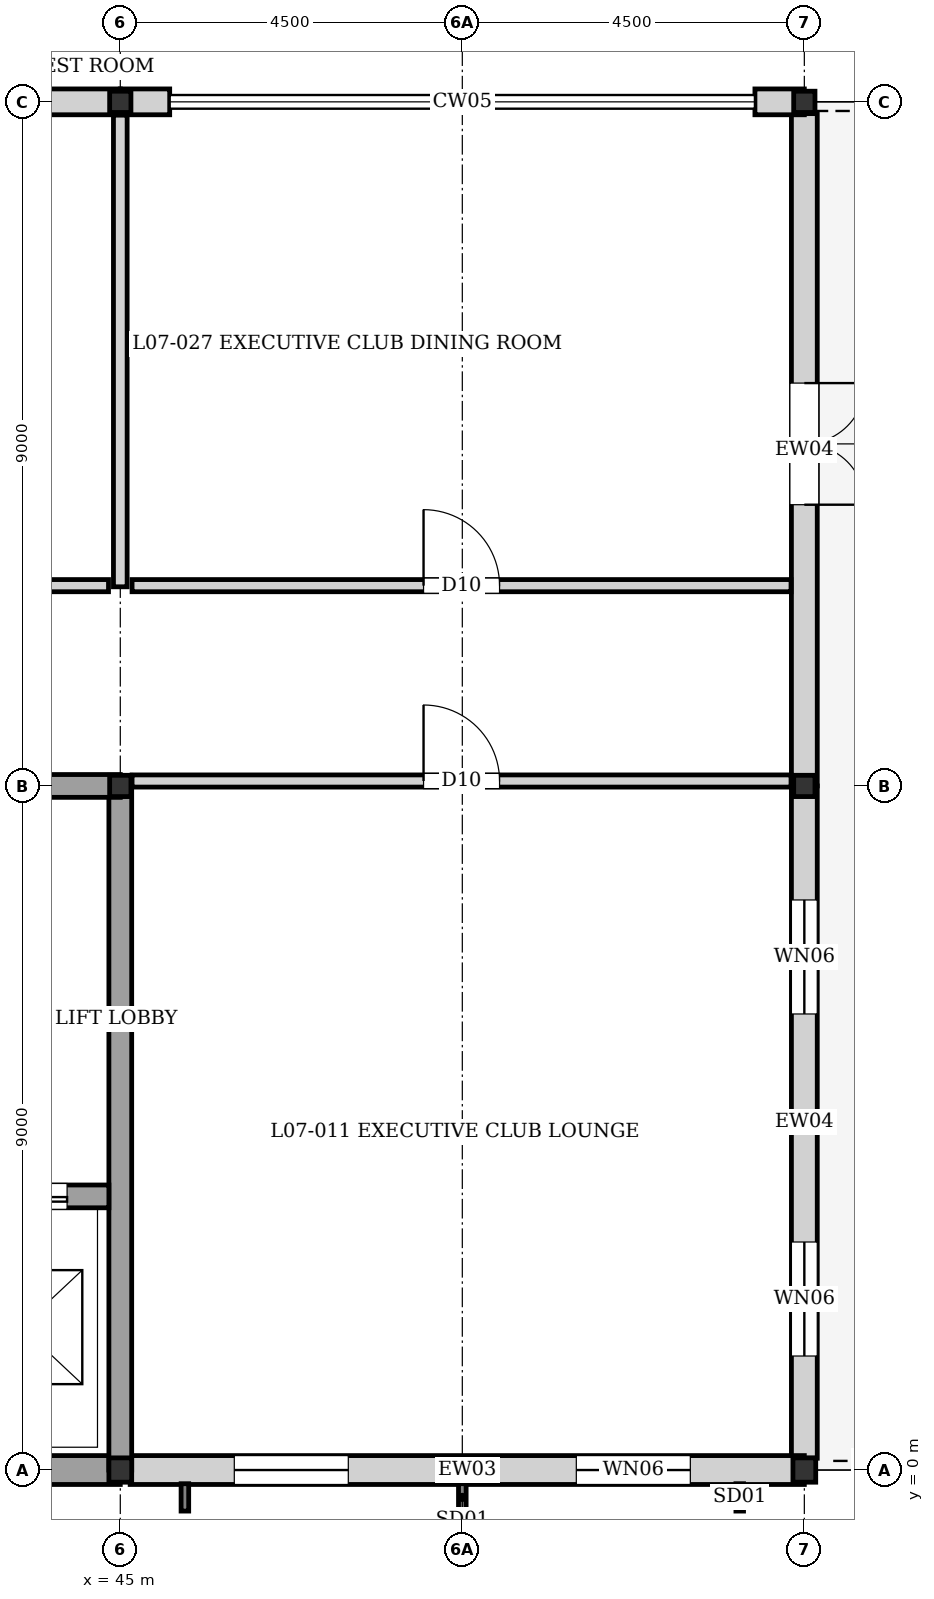
"""IFC4 building model, lengths in metres.
Left out: names, types, materials, properties, quantities, classifications, styles, units other than length and angle.
Written with IfcOpenShell. Run it as: python <this file> out.ifc"""

import sys

from ifc_helpers import new_model, si_unit, direction, frame, frame_2d, origin, origin_2d, place, context, subcontext, project, spatial, rectangle, i_section, extrude, element, fill, save


model = new_model("IFC4")
c1 = context("Model", 3, precision=1e-05, world=origin(), true_north=direction((0.0, 1.0)))
c2 = subcontext(c1, "Body", "Model", "MODEL_VIEW")
j1 = project(units=[si_unit("LENGTHUNIT", "METRE"), si_unit("PLANEANGLEUNIT", "RADIAN")], contexts=[c1])
p1 = place(None, origin())
s1 = spatial("IfcSite", under=j1, at=p1, CompositionType="ELEMENT")
p2 = place(p1, origin())
s2 = spatial("IfcBuilding", under=s1, at=p2, CompositionType="ELEMENT")
p3 = place(p2, frame((0.0, 0.0, 23.68)))
s3 = spatial("IfcBuildingStorey", under=s2, at=p3, CompositionType="ELEMENT", Elevation=23.68)
p4 = place(p3, frame((45.0, 0.0, 0.0), z_axis=(0.0, 0.0, 1.0), x_axis=(1.0, 0.0, 0.0)))
e1 = element("IfcColumn", 1, at=p4, inside=s3, PredefinedType="COLUMN", context=c2, shape_type="SweptSolid", body=[
    extrude(i_section(OverallWidth=0.3, OverallDepth=0.32, WebThickness=0.011, FlangeThickness=0.021, at=origin_2d()), origin(), (0.0, 0.0, 1.0), 3.2),
])
for number, where, z_axis, x_axis in (
    (2, (45.0, 9.0, 0.0), (0.0, 0.0, 1.0), (1.0, 0.0, 0.0)),
    (3, (45.0, 18.0, 0.0), (0.0, 0.0, 1.0), (1.0, 0.0, 0.0)),
):
    element("IfcColumn", number, at=place(p3, frame(where, z_axis=z_axis, x_axis=x_axis)), inside=s3, PredefinedType="COLUMN", context=c2, shape_type="SweptSolid", body=[
        extrude(i_section(OverallWidth=0.28, OverallDepth=0.28, WebThickness=0.01, FlangeThickness=0.018, at=origin_2d()), origin(), (0.0, 0.0, 1.0), 3.2),
    ])
p5 = place(p3, frame((54.0, 0.0, 0.0), z_axis=(0.0, 0.0, 1.0), x_axis=(1.0, 0.0, 0.0)))
e4 = element("IfcColumn", 4, at=p5, inside=s3, PredefinedType="COLUMN", context=c2, shape_type="SweptSolid", body=[
    extrude(i_section(OverallWidth=0.3, OverallDepth=0.32, WebThickness=0.011, FlangeThickness=0.021, at=origin_2d()), origin(), (0.0, 0.0, 1.0), 3.2),
])
for number, where, z_axis, x_axis in (
    (5, (54.0, 9.0, 0.0), (0.0, 0.0, 1.0), (1.0, 0.0, 0.0)),
    (6, (54.0, 18.0, 0.0), (0.0, 0.0, 1.0), (1.0, 0.0, 0.0)),
):
    element("IfcColumn", number, at=place(p3, frame(where, z_axis=z_axis, x_axis=x_axis)), inside=s3, PredefinedType="COLUMN", context=c2, shape_type="SweptSolid", body=[
        extrude(i_section(OverallWidth=0.28, OverallDepth=0.28, WebThickness=0.01, FlangeThickness=0.018, at=origin_2d()), origin(), (0.0, 0.0, 1.0), 3.2),
    ])
p6 = place(p3, frame((54.0, 17.845, 0.0), z_axis=(0.0, 0.0, 1.0), x_axis=(0.0, -1.0, 0.0)))
e7 = element("IfcWall", 7, at=p6, inside=s3, PredefinedType="SOLIDWALL", context=c2, shape_type="SweptSolid", body=[
    extrude(rectangle(XDim=8.845, YDim=0.34, at=frame_2d((4.422, 0.0))), origin(), (0.0, 0.0, 1.0), 2.56),
])
p7 = place(p6, frame((3.545, 0.0, 0.0)))
e8 = element("IfcOpeningElement", 8, at=p7, cuts=e7, PredefinedType="OPENING", context=c2, shape_type="SweptSolid", body=[
    extrude(rectangle(XDim=1.6, YDim=2.25, at=frame_2d((0.8, 1.125))), frame((0.0, 0.18, 0.0), z_axis=(0.0, -1.0, 0.0), x_axis=(1.0, 0.0, 0.0)), (0.0, 0.0, 1.0), 0.36),
])
p8 = place(p3, frame((54.0, 9.0, 0.0), z_axis=(0.0, 0.0, 1.0), x_axis=(0.0, -1.0, 0.0)))
e9 = element("IfcWall", 9, at=p8, inside=s3, PredefinedType="SOLIDWALL", context=c2, shape_type="SweptSolid", body=[
    extrude(rectangle(XDim=8.845, YDim=0.34, at=frame_2d((4.422, 0.0))), origin(), (0.0, 0.0, 1.0), 2.6),
])
p9 = place(p8, frame((1.5, 0.0, 0.35)))
e10 = element("IfcOpeningElement", 10, at=p9, cuts=e9, PredefinedType="OPENING", context=c2, shape_type="SweptSolid", body=[
    extrude(rectangle(XDim=1.5, YDim=1.8, at=frame_2d((0.75, 0.9))), frame((0.0, 0.18, 0.0), z_axis=(0.0, -1.0, 0.0), x_axis=(1.0, 0.0, 0.0)), (0.0, 0.0, 1.0), 0.36),
])
p10 = place(p8, frame((6.0, 0.0, 0.35)))
e11 = element("IfcOpeningElement", 11, at=p10, cuts=e9, PredefinedType="OPENING", context=c2, shape_type="SweptSolid", body=[
    extrude(rectangle(XDim=1.5, YDim=1.8, at=frame_2d((0.75, 0.9))), frame((0.0, 0.18, 0.0), z_axis=(0.0, -1.0, 0.0), x_axis=(1.0, 0.0, 0.0)), (0.0, 0.0, 1.0), 0.36),
])
p11 = place(p3, frame((54.0, 0.0, 0.0), z_axis=(0.0, 0.0, 1.0), x_axis=(-1.0, 0.0, 0.0)))
e12 = element("IfcWall", 12, at=p11, inside=s3, PredefinedType="SOLIDWALL", context=c2, shape_type="SweptSolid", body=[
    extrude(rectangle(XDim=8.87, YDim=0.38, at=frame_2d((4.435, 0.0))), origin(), (0.0, 0.0, 1.0), 2.6),
])
p12 = place(p11, frame((1.5, 0.0, 0.35)))
e13 = element("IfcOpeningElement", 13, at=p12, cuts=e12, PredefinedType="OPENING", context=c2, shape_type="SweptSolid", body=[
    extrude(rectangle(XDim=1.5, YDim=1.8, at=frame_2d((0.75, 0.9))), frame((0.0, 0.2, 0.0), z_axis=(0.0, -1.0, 0.0), x_axis=(1.0, 0.0, 0.0)), (0.0, 0.0, 1.0), 0.4),
])
p13 = place(p11, frame((6.0, 0.0, 0.35)))
e14 = element("IfcOpeningElement", 14, at=p13, cuts=e12, PredefinedType="OPENING", context=c2, shape_type="SweptSolid", body=[
    extrude(rectangle(XDim=1.5, YDim=1.8, at=frame_2d((0.75, 0.9))), frame((0.0, 0.2, 0.0), z_axis=(0.0, -1.0, 0.0), x_axis=(1.0, 0.0, 0.0)), (0.0, 0.0, 1.0), 0.4),
])
p14 = place(p3, frame((45.0, 0.0, 0.0), z_axis=(0.0, 0.0, 1.0), x_axis=(-1.0, 0.0, 0.0)))
e15 = element("IfcWall", 15, at=p14, inside=s3, PredefinedType="SOLIDWALL", context=c2, shape_type="SweptSolid", body=[
    extrude(rectangle(XDim=9.0, YDim=0.38, at=frame_2d((4.5, 0.0))), origin(), (0.0, 0.0, 1.0), 2.96),
])
p15 = place(p3, frame((36.0, 18.0, 0.0), z_axis=(0.0, 0.0, 1.0), x_axis=(1.0, 0.0, 0.0)))
e16 = element("IfcWall", 16, at=p15, inside=s3, PredefinedType="SOLIDWALL", context=c2, shape_type="SweptSolid", body=[
    extrude(rectangle(XDim=9.0, YDim=0.34, at=frame_2d((4.5, 0.0))), origin(), (0.0, 0.0, 1.0), 2.66),
])
p16 = place(p15, frame((1.5, 0.0, 0.35)))
e17 = element("IfcOpeningElement", 17, at=p16, cuts=e16, PredefinedType="OPENING", context=c2, shape_type="SweptSolid", body=[
    extrude(rectangle(XDim=1.5, YDim=1.8, at=frame_2d((0.75, 0.9))), frame((0.0, 0.18, 0.0), z_axis=(0.0, -1.0, 0.0), x_axis=(1.0, 0.0, 0.0)), (0.0, 0.0, 1.0), 0.36),
])
p17 = place(p15, frame((6.0, 0.0, 0.35)))
e18 = element("IfcOpeningElement", 18, at=p17, cuts=e16, PredefinedType="OPENING", context=c2, shape_type="SweptSolid", body=[
    extrude(rectangle(XDim=1.5, YDim=1.8, at=frame_2d((0.75, 0.9))), frame((0.0, 0.18, 0.0), z_axis=(0.0, -1.0, 0.0), x_axis=(1.0, 0.0, 0.0)), (0.0, 0.0, 1.0), 0.36),
])
for number, where, z_axis, x_axis in (
    (19, (45.0, 18.0, 0.0), (0.0, 0.0, 1.0), (1.0, 0.0, 0.0)),
    (20, (53.35, 18.0, 0.0), (0.0, 0.0, 1.0), (1.0, 0.0, 0.0)),
):
    element("IfcWall", number, at=place(p3, frame(where, z_axis=z_axis, x_axis=x_axis)), inside=s3, PredefinedType="SOLIDWALL", context=c2, shape_type="SweptSolid", body=[
        extrude(rectangle(XDim=0.65, YDim=0.34, at=frame_2d((0.325, 0.0))), origin(), (0.0, 0.0, 1.0), 2.6),
    ])
p18 = place(p3, frame((45.0, 0.0, 0.0), z_axis=(0.0, 0.0, 1.0), x_axis=(0.0, 1.0, 0.0)))
e21 = element("IfcWall", 21, at=p18, inside=s3, PredefinedType="SHEAR", context=c2, shape_type="SweptSolid", body=[
    extrude(rectangle(XDim=9.0, YDim=0.3, at=frame_2d((4.5, 0.0))), origin(), (0.0, 0.0, 1.0), 2.96),
])
p19 = place(p3, frame((36.0, 9.0, 0.0), z_axis=(0.0, 0.0, 1.0), x_axis=(1.0, 0.0, 0.0)))
e22 = element("IfcWall", 22, at=p19, inside=s3, PredefinedType="SHEAR", context=c2, shape_type="SweptSolid", body=[
    extrude(rectangle(XDim=9.0, YDim=0.3, at=frame_2d((4.5, 0.0))), origin(), (0.0, 0.0, 1.0), 2.96),
])
p20 = place(p19, frame((5.95, 0.0, 0.0)))
e23 = element("IfcOpeningElement", 23, at=p20, cuts=e22, PredefinedType="OPENING", context=c2, shape_type="SweptSolid", body=[
    extrude(rectangle(XDim=1.6, YDim=2.1, at=frame_2d((0.8, 1.05))), frame((0.0, 0.16, 0.0), z_axis=(0.0, -1.0, 0.0), x_axis=(1.0, 0.0, 0.0)), (0.0, 0.0, 1.0), 0.32),
])
p21 = place(p3, frame((40.65, 3.6, 0.0), z_axis=(0.0, 0.0, 1.0), x_axis=(1.0, 0.0, 0.0)))
e24 = element("IfcWall", 24, at=p21, inside=s3, PredefinedType="SHEAR", context=c2, shape_type="SweptSolid", body=[
    extrude(rectangle(XDim=4.2, YDim=0.3, at=frame_2d((2.1, 0.0))), origin(), (0.0, 0.0, 1.0), 2.96),
])
p22 = place(p21, frame((0.55, 0.0, 0.0)))
e25 = element("IfcOpeningElement", 25, at=p22, cuts=e24, PredefinedType="OPENING", context=c2, shape_type="SweptSolid", body=[
    extrude(rectangle(XDim=1.1, YDim=2.1, at=frame_2d((0.55, 1.05))), frame((0.0, 0.16, 0.0), z_axis=(0.0, -1.0, 0.0), x_axis=(1.0, 0.0, 0.0)), (0.0, 0.0, 1.0), 0.32),
])
p23 = place(p21, frame((2.45, 0.0, 0.0)))
e26 = element("IfcOpeningElement", 26, at=p23, cuts=e24, PredefinedType="OPENING", context=c2, shape_type="SweptSolid", body=[
    extrude(rectangle(XDim=1.2, YDim=2.2, at=frame_2d((0.6, 1.1))), frame((0.0, 0.16, 0.0), z_axis=(0.0, -1.0, 0.0), x_axis=(1.0, 0.0, 0.0)), (0.0, 0.0, 1.0), 0.32),
])
p24 = place(p3, frame((45.0, 11.62, 0.0), z_axis=(0.0, 0.0, 1.0), x_axis=(0.0, 1.0, 0.0)))
e27 = element("IfcWall", 27, at=p24, inside=s3, PredefinedType="PARTITIONING", context=c2, shape_type="SweptSolid", body=[
    extrude(rectangle(XDim=6.205, YDim=0.18, at=frame_2d((3.103, 0.0))), origin(), (0.0, 0.0, 1.0), 2.63),
])
p25 = place(p3, frame((45.155, 9.065, 0.0), z_axis=(0.0, 0.0, 1.0), x_axis=(1.0, 0.0, 0.0)))
e28 = element("IfcWall", 28, at=p25, inside=s3, PredefinedType="PARTITIONING", context=c2, shape_type="SweptSolid", body=[
    extrude(rectangle(XDim=8.67, YDim=0.16, at=frame_2d((4.335, 0.0))), origin(), (0.0, 0.0, 1.0), 2.46),
])
p26 = place(p25, frame((3.835, 0.0, 0.0)))
e29 = element("IfcOpeningElement", 29, at=p26, cuts=e28, PredefinedType="OPENING", context=c2, shape_type="SweptSolid", body=[
    extrude(rectangle(XDim=1.0, YDim=2.1, at=frame_2d((0.5, 1.05))), frame((0.0, 0.09, 0.0), z_axis=(0.0, -1.0, 0.0), x_axis=(1.0, 0.0, 0.0)), (0.0, 0.0, 1.0), 0.18),
])
p27 = place(p3, frame((42.735, 11.635, 0.0), z_axis=(0.0, 0.0, 1.0), x_axis=(1.0, 0.0, 0.0)))
e30 = element("IfcWall", 30, at=p27, inside=s3, PredefinedType="PARTITIONING", context=c2, shape_type="SweptSolid", body=[
    extrude(rectangle(XDim=2.11, YDim=0.16, at=frame_2d((1.055, 0.0))), origin(), (0.0, 0.0, 1.0), 2.96),
])
p28 = place(p27, frame((0.327, 0.0, 0.0)))
e31 = element("IfcOpeningElement", 31, at=p28, cuts=e30, PredefinedType="OPENING", context=c2, shape_type="SweptSolid", body=[
    extrude(rectangle(XDim=0.95, YDim=2.15, at=frame_2d((0.475, 1.075))), frame((0.0, 0.09, 0.0), z_axis=(0.0, -1.0, 0.0), x_axis=(1.0, 0.0, 0.0)), (0.0, 0.0, 1.0), 0.18),
])
p29 = place(p3, frame((45.155, 11.635, 0.0), z_axis=(0.0, 0.0, 1.0), x_axis=(1.0, 0.0, 0.0)))
e32 = element("IfcWall", 32, at=p29, inside=s3, PredefinedType="PARTITIONING", context=c2, shape_type="SweptSolid", body=[
    extrude(rectangle(XDim=8.67, YDim=0.16, at=frame_2d((4.335, 0.0))), origin(), (0.0, 0.0, 1.0), 2.96),
])
p30 = place(p29, frame((3.835, 0.0, 0.0)))
e33 = element("IfcOpeningElement", 33, at=p30, cuts=e32, PredefinedType="OPENING", context=c2, shape_type="SweptSolid", body=[
    extrude(rectangle(XDim=1.0, YDim=2.1, at=frame_2d((0.5, 1.05))), frame((0.0, 0.09, 0.0), z_axis=(0.0, -1.0, 0.0), x_axis=(1.0, 0.0, 0.0)), (0.0, 0.0, 1.0), 0.18),
])
p31 = place(p7, origin())
e34 = element("IfcDoor", 34, at=p31, inside=s3, OperationType="DOUBLE_DOOR_SINGLE_SWING", PredefinedType="DOOR", context=c2, shape_type="SweptSolid", body=[
    extrude(rectangle(XDim=1.6, YDim=2.25, at=frame_2d((0.8, 1.125))), frame((0.0, 0.025, 0.0), z_axis=(0.0, -1.0, 0.0), x_axis=(1.0, 0.0, 0.0)), (0.0, 0.0, 1.0), 0.05),
])
fill(e8, e34)
p32 = place(p9, origin())
e35 = element("IfcWindow", 35, at=p32, inside=s3, PartitioningType="SINGLE_PANEL", PredefinedType="WINDOW", context=c2, shape_type="SweptSolid", body=[
    extrude(rectangle(XDim=1.5, YDim=1.8, at=frame_2d((0.75, 0.9))), frame((0.0, 0.03, 0.0), z_axis=(0.0, -1.0, 0.0), x_axis=(1.0, 0.0, 0.0)), (0.0, 0.0, 1.0), 0.06),
])
fill(e10, e35)
p33 = place(p10, origin())
e36 = element("IfcWindow", 36, at=p33, inside=s3, PartitioningType="SINGLE_PANEL", PredefinedType="WINDOW", context=c2, shape_type="SweptSolid", body=[
    extrude(rectangle(XDim=1.5, YDim=1.8, at=frame_2d((0.75, 0.9))), frame((0.0, 0.03, 0.0), z_axis=(0.0, -1.0, 0.0), x_axis=(1.0, 0.0, 0.0)), (0.0, 0.0, 1.0), 0.06),
])
fill(e11, e36)
p34 = place(p12, origin())
e37 = element("IfcWindow", 37, at=p34, inside=s3, PartitioningType="SINGLE_PANEL", PredefinedType="WINDOW", context=c2, shape_type="SweptSolid", body=[
    extrude(rectangle(XDim=1.5, YDim=1.8, at=frame_2d((0.75, 0.9))), frame((0.0, 0.03, 0.0), z_axis=(0.0, -1.0, 0.0), x_axis=(1.0, 0.0, 0.0)), (0.0, 0.0, 1.0), 0.06),
])
fill(e13, e37)
p35 = place(p13, origin())
e38 = element("IfcWindow", 38, at=p35, inside=s3, PartitioningType="SINGLE_PANEL", PredefinedType="WINDOW", context=c2, shape_type="SweptSolid", body=[
    extrude(rectangle(XDim=1.5, YDim=1.8, at=frame_2d((0.75, 0.9))), frame((0.0, 0.03, 0.0), z_axis=(0.0, -1.0, 0.0), x_axis=(1.0, 0.0, 0.0)), (0.0, 0.0, 1.0), 0.06),
])
fill(e14, e38)
p36 = place(p23, origin())
e39 = element("IfcDoor", 39, at=p36, inside=s3, OperationType="DOUBLE_DOOR_SLIDING", PredefinedType="DOOR", context=c2, shape_type="SweptSolid", body=[
    extrude(rectangle(XDim=1.2, YDim=2.2, at=frame_2d((0.6, 1.1))), frame((0.0, 0.025, 0.0), z_axis=(0.0, -1.0, 0.0), x_axis=(1.0, 0.0, 0.0)), (0.0, 0.0, 1.0), 0.05),
])
fill(e26, e39)
p37 = place(p26, origin())
e40 = element("IfcDoor", 40, at=p37, inside=s3, OperationType="SINGLE_SWING_LEFT", PredefinedType="DOOR", context=c2, shape_type="SweptSolid", body=[
    extrude(rectangle(XDim=1.0, YDim=2.1, at=frame_2d((0.5, 1.05))), frame((0.0, 0.025, 0.0), z_axis=(0.0, -1.0, 0.0), x_axis=(1.0, 0.0, 0.0)), (0.0, 0.0, 1.0), 0.05),
])
fill(e29, e40)
p38 = place(p30, origin())
e41 = element("IfcDoor", 41, at=p38, inside=s3, OperationType="SINGLE_SWING_LEFT", PredefinedType="DOOR", context=c2, shape_type="SweptSolid", body=[
    extrude(rectangle(XDim=1.0, YDim=2.1, at=frame_2d((0.5, 1.05))), frame((0.0, 0.025, 0.0), z_axis=(0.0, -1.0, 0.0), x_axis=(1.0, 0.0, 0.0)), (0.0, 0.0, 1.0), 0.05),
])
fill(e33, e41)
save(model, sys.argv[1])
